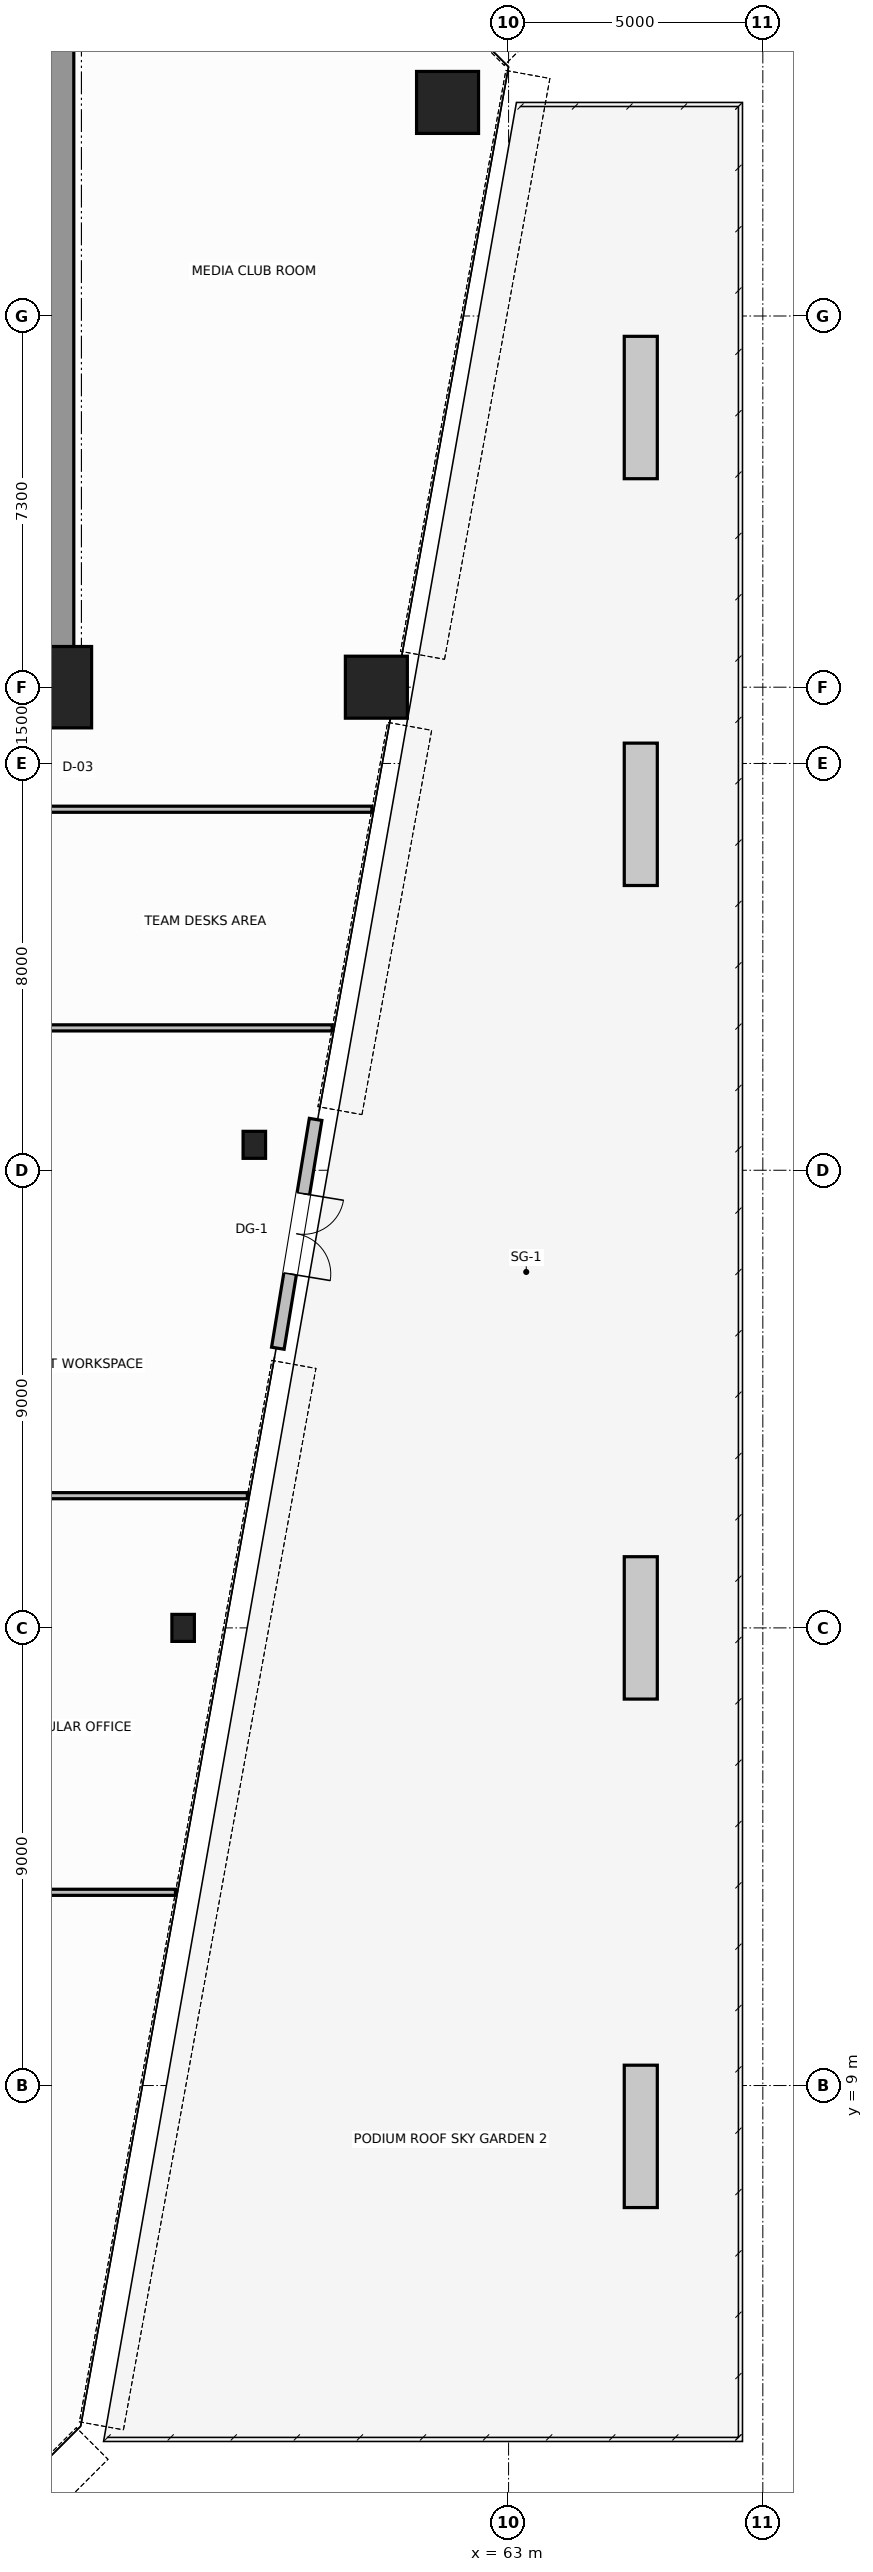
"""IFC4 building model, lengths in metres.
Left out: names, types, materials, properties, quantities, classifications, styles, units other than length and angle.
Written with IfcOpenShell. Run it as: python <this file> out.ifc"""

import sys

from ifc_helpers import new_model, si_unit, direction, frame, frame_2d, origin, origin_2d, place, context, subcontext, project, spatial, rectangle, hollow_circle, i_section, extrude, source, transform, mapped, element, fill, save


model = new_model("IFC4")
c1 = context("Model", 3, precision=1e-05, world=origin(), true_north=direction((0.0, 1.0)))
c2 = subcontext(c1, "Body", "Model", "MODEL_VIEW")
j1 = project(units=[si_unit("LENGTHUNIT", "METRE"), si_unit("PLANEANGLEUNIT", "RADIAN")], contexts=[c1])
p1 = place(None, origin())
s1 = spatial("IfcSite", under=j1, at=p1, CompositionType="ELEMENT")
p2 = place(p1, origin())
s2 = spatial("IfcBuilding", under=s1, at=p2, CompositionType="ELEMENT")
p3 = place(p2, frame((0.0, 0.0, 18.8)))
s3 = spatial("IfcBuildingStorey", under=s2, at=p3, CompositionType="ELEMENT", Elevation=18.8)
m1 = source(origin(), c2, "Body", "SweptSolid", [
    extrude(rectangle(XDim=1.6, YDim=1.6, at=origin_2d()), origin(), (0.0, 0.0, 1.0), 3.8),
])
p4 = place(p3, frame((54.0, 36.5, 0.0), z_axis=(0.0, 0.0, 1.0), x_axis=(1.0, 0.0, 0.0)))
e1 = element("IfcColumn", 1, at=p4, inside=s3, PredefinedType="COLUMN", context=c2, shape_type="MappedRepresentation", body=[
    mapped(m1, transform((0.0, 0.0, 0.0), scale=1.0)),
])
m2 = source(origin(), c2, "Body", "SweptSolid", [
    extrude(hollow_circle(Radius=0.61, WallThickness=0.05, at=origin_2d()), origin(), (0.0, 0.0, 1.0), 3.8),
])
for number, where, z_axis, x_axis in (
    (2, (61.8, 48.0, 0.0), (0.0, 0.0, 1.0), (1.0, 0.0, 0.0)),
    (3, (60.4, 36.5, 0.0), (0.0, 0.0, 1.0), (1.0, 0.0, 0.0)),
):
    element("IfcColumn", number, at=place(p3, frame(where, z_axis=z_axis, x_axis=x_axis)), inside=s3, PredefinedType="COLUMN", context=c2, shape_type="MappedRepresentation", body=[
        mapped(m2, transform((0.0, 0.0, 0.0), scale=1.0)),
    ])
m3 = source(origin(), c2, "Body", "SweptSolid", [
    extrude(i_section(OverallWidth=0.442, OverallDepth=0.531, WebThickness=0.065, FlangeThickness=0.076, FilletRadius=0.015, at=origin_2d()), origin(), (0.0, 0.0, 1.0), 3.8),
])
for number, where, z_axis, x_axis in (
    (4, (58.0, 27.5, 0.0), (0.0, 0.0, 1.0), (1.0, 0.0, 0.0)),
    (5, (56.6, 18.0, 0.0), (0.0, 0.0, 1.0), (1.0, 0.0, 0.0)),
):
    element("IfcColumn", number, at=place(p3, frame(where, z_axis=z_axis, x_axis=x_axis)), inside=s3, PredefinedType="COLUMN", context=c2, shape_type="MappedRepresentation", body=[
        mapped(m3, transform((0.0, 0.0, 0.0), scale=1.0)),
    ])
p5 = place(p3, frame((54.0, 36.5, 0.0), z_axis=(0.0, 0.0, 1.0), x_axis=(0.0, 1.0, 0.0)))
e6 = element("IfcWall", 6, at=p5, inside=s3, PredefinedType="SHEAR", context=c2, shape_type="SweptSolid", body=[
    extrude(rectangle(XDim=14.5, YDim=0.9, at=frame_2d((7.25, 0.0))), origin(), (0.0, 0.0, 1.0), 3.8),
])
p6 = place(p3, frame((59.205, 28.0, 0.0), z_axis=(0.0, 0.0, 1.0), x_axis=(-0.162836302539, -0.98665309941, 0.0)))
e7 = element("IfcWall", 7, at=p6, inside=s3, PredefinedType="STANDARD", context=c2, shape_type="SweptSolid", body=[
    extrude(rectangle(XDim=4.561, YDim=0.25, at=frame_2d((2.28, 0.0))), origin(), (0.0, 0.0, 1.0), 3.58),
])
p7 = place(p6, frame((1.48, 0.0, 0.0)))
e8 = element("IfcOpeningElement", 8, at=p7, cuts=e7, PredefinedType="OPENING", context=c2, shape_type="SweptSolid", body=[
    extrude(rectangle(XDim=1.6, YDim=2.3, at=frame_2d((0.8, 1.15))), frame((0.0, 0.135, 0.0), z_axis=(0.0, -1.0, 0.0), x_axis=(1.0, 0.0, 0.0)), (0.0, 0.0, 1.0), 0.27),
])
for number, where, z_axis, x_axis in (
    (9, (65.6, 6.6, 0.0), (0.0, 0.0, 1.0), (0.0, 1.0, 0.0)),
    (10, (65.6, 16.6, 0.0), (0.0, 0.0, 1.0), (0.0, 1.0, 0.0)),
    (11, (65.6, 32.6, 0.0), (0.0, 0.0, 1.0), (0.0, 1.0, 0.0)),
    (12, (65.6, 40.6, 0.0), (0.0, 0.0, 1.0), (0.0, 1.0, 0.0)),
):
    element("IfcWall", number, at=place(p3, frame(where, z_axis=z_axis, x_axis=x_axis)), inside=s3, PredefinedType="PARAPET", context=c2, shape_type="SweptSolid", body=[
        extrude(rectangle(XDim=2.8, YDim=0.65, at=frame_2d((1.4, 0.0))), origin(), (0.0, 0.0, 1.0), 0.65),
    ])
p8 = place(p3, frame((50.86, 34.1, 0.0), z_axis=(0.0, 0.0, 1.0), x_axis=(1.0, 0.0, 0.0)))
e13 = element("IfcWall", 13, at=p8, inside=s3, PredefinedType="PARTITIONING", context=c2, shape_type="SweptSolid", body=[
    extrude(rectangle(XDim=9.452, YDim=0.12, at=frame_2d((4.726, 0.0))), origin(), (0.0, 0.0, 1.0), 3.58),
])
p9 = place(p3, frame((50.86, 12.8, 0.0), z_axis=(0.0, 0.0, 1.0), x_axis=(1.0, 0.0, 0.0)))
e14 = element("IfcWall", 14, at=p9, inside=s3, PredefinedType="PARTITIONING", context=c2, shape_type="SweptSolid", body=[
    extrude(rectangle(XDim=5.589, YDim=0.12, at=frame_2d((2.794, 0.0))), origin(), (0.0, 0.0, 1.0), 3.58),
])
p10 = place(p3, frame((50.86, 20.6, 0.0), z_axis=(0.0, 0.0, 1.0), x_axis=(1.0, 0.0, 0.0)))
e15 = element("IfcWall", 15, at=p10, inside=s3, PredefinedType="PARTITIONING", context=c2, shape_type="SweptSolid", body=[
    extrude(rectangle(XDim=7.004, YDim=0.12, at=frame_2d((3.502, 0.0))), origin(), (0.0, 0.0, 1.0), 3.58),
])
p11 = place(p3, frame((50.86, 29.8, 0.0), z_axis=(0.0, 0.0, 1.0), x_axis=(1.0, 0.0, 0.0)))
e16 = element("IfcWall", 16, at=p11, inside=s3, PredefinedType="PARTITIONING", context=c2, shape_type="SweptSolid", body=[
    extrude(rectangle(XDim=8.672, YDim=0.12, at=frame_2d((4.336, 0.0))), origin(), (0.0, 0.0, 1.0), 3.58),
])
m4 = source(origin(), c2, "Body", "SweptSolid", [
    extrude(rectangle(XDim=1.6, YDim=2.3, at=frame_2d((0.8, 1.15))), frame((0.0, 0.025, 0.0), z_axis=(0.0, -1.0, 0.0), x_axis=(1.0, 0.0, 0.0)), (0.0, 0.0, 1.0), 0.05),
])
p12 = place(p7, origin())
e17 = element("IfcDoor", 17, at=p12, inside=s3, OperationType="DOUBLE_DOOR_SINGLE_SWING", PredefinedType="DOOR", context=c2, shape_type="MappedRepresentation", body=[
    mapped(m4, transform((0.0, 0.0, 0.0), scale=1.0)),
])
fill(e8, e17)
save(model, sys.argv[1])
